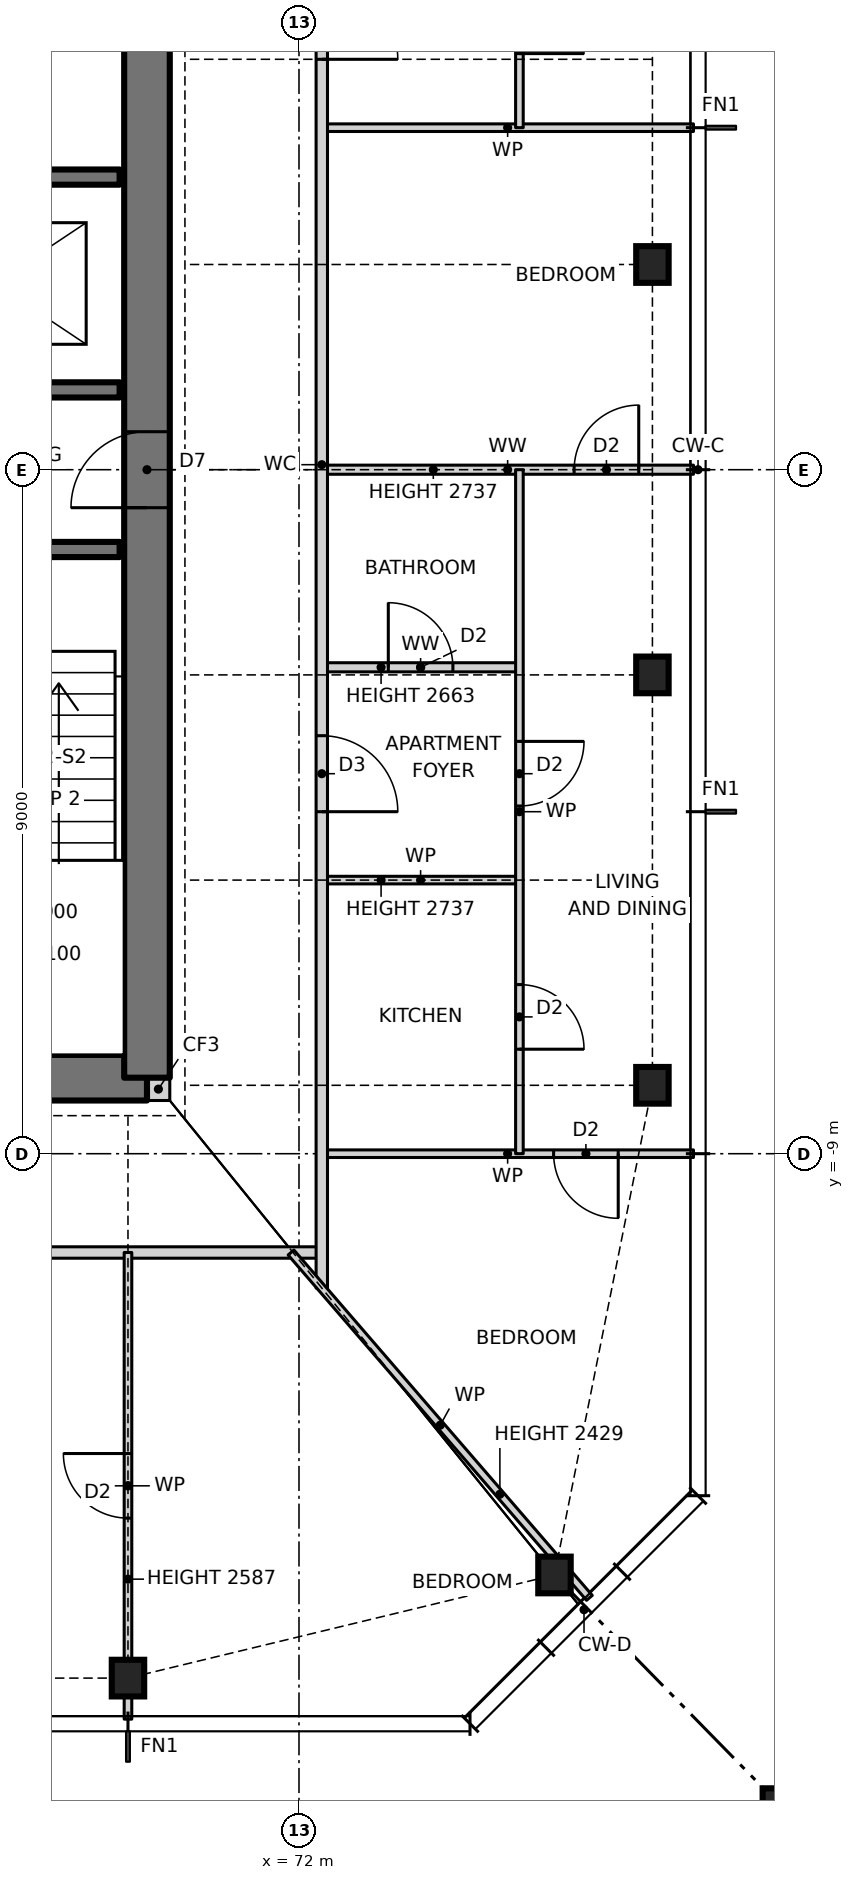
"""IFC4 building model, lengths in metres.
Left out: names, types, materials, properties, quantities, classifications, styles, units other than length and angle.
Written with IfcOpenShell. Run it as: python <this file> out.ifc"""

import sys

from ifc_helpers import new_model, si_unit, direction, frame, frame_2d, origin, origin_2d, place, context, subcontext, project, spatial, rectangle, hollow_rectangle, i_section, extrude, element, fill, save


model = new_model("IFC4")
c1 = context("Model", 3, precision=1e-05, world=origin(), true_north=direction((0.0, 1.0)))
c2 = subcontext(c1, "Body", "Model", "MODEL_VIEW")
j1 = project(units=[si_unit("LENGTHUNIT", "METRE"), si_unit("PLANEANGLEUNIT", "RADIAN")], contexts=[c1])
p1 = place(None, origin())
s1 = spatial("IfcSite", under=j1, at=p1, CompositionType="ELEMENT")
p2 = place(p1, origin())
s2 = spatial("IfcBuilding", under=s1, at=p2, CompositionType="ELEMENT")
p3 = place(p2, frame((0.0, 0.0, 105.0)))
s3 = spatial("IfcBuildingStorey", under=s2, at=p3, CompositionType="ELEMENT", Elevation=105.0)
for number, where, z_axis, x_axis in (
    (1, (69.75, -15.9, 0.0), (0.0, 0.0, 1.0), (1.0, 0.0, 0.0)),
    (2, (75.361, -14.543, 0.0), (0.0, 0.0, 1.0), (1.0, 0.0, 0.0)),
    (3, (76.65, -8.1, 0.0), (0.0, 0.0, 1.0), (1.0, 0.0, 0.0)),
    (4, (76.65, -2.7, 0.0), (0.0, 0.0, 1.0), (1.0, 0.0, 0.0)),
    (5, (76.65, 2.7, 0.0), (0.0, 0.0, 1.0), (1.0, 0.0, 0.0)),
):
    element("IfcColumn", number, at=place(p3, frame(where, z_axis=z_axis, x_axis=x_axis)), inside=s3, PredefinedType="COLUMN", context=c2, shape_type="SweptSolid", body=[
        extrude(i_section(OverallWidth=0.427, OverallDepth=0.483, WebThickness=0.051, FlangeThickness=0.082, at=origin_2d()), origin(), (0.0, 0.0, 1.0), 3.5),
    ])
p4 = place(p3, frame((78.65, -17.9, 0.0), z_axis=(0.0, 0.0, 1.0), x_axis=(1.0, 0.0, 0.0)))
e6 = element("IfcColumn", 6, at=p4, inside=s3, PredefinedType="COLUMN", context=c2, shape_type="SweptSolid", body=[
    extrude(hollow_rectangle(XDim=1.1, YDim=1.1, WallThickness=0.06, at=origin_2d()), origin(), (0.0, 0.0, 1.0), 3.5),
])
p5 = place(p3, frame((70.0, -8.15, 0.0), z_axis=(0.0, 0.0, 1.0), x_axis=(1.0, 0.0, 0.0)))
e7 = element("IfcWall", 7, at=p5, inside=s3, PredefinedType="SOLIDWALL", context=c2, shape_type="SweptSolid", body=[
    extrude(rectangle(XDim=0.3, YDim=0.3, at=frame_2d((0.15, 0.0))), origin(), (0.0, 0.0, 1.0), 3.5),
])
p6 = place(p3, frame((56.0, -8.0, 0.0), z_axis=(0.0, 0.0, 1.0), x_axis=(1.0, 0.0, 0.0)))
e8 = element("IfcWall", 8, at=p6, inside=s3, PredefinedType="SHEAR", context=c2, shape_type="SweptSolid", body=[
    extrude(rectangle(XDim=14.0, YDim=0.6, at=frame_2d((7.0, 0.0))), origin(), (0.0, 0.0, 1.0), 3.5),
])
p7 = place(p6, frame((2.7, 0.0, 0.0)))
e9 = element("IfcOpeningElement", 9, at=p7, cuts=e8, PredefinedType="OPENING", context=c2, shape_type="SweptSolid", body=[
    extrude(rectangle(XDim=0.9, YDim=2.1, at=frame_2d((0.45, 1.05))), frame((0.0, 0.31, 0.0), z_axis=(0.0, -1.0, 0.0), x_axis=(1.0, 0.0, 0.0)), (0.0, 0.0, 1.0), 0.62),
])
p8 = place(p6, frame((7.7, 0.0, 0.0)))
e10 = element("IfcOpeningElement", 10, at=p8, cuts=e8, PredefinedType="OPENING", context=c2, shape_type="SweptSolid", body=[
    extrude(rectangle(XDim=0.9, YDim=2.1, at=frame_2d((0.45, 1.05))), frame((0.0, 0.31, 0.0), z_axis=(0.0, -1.0, 0.0), x_axis=(1.0, 0.0, 0.0)), (0.0, 0.0, 1.0), 0.62),
])
p9 = place(p3, frame((70.0, -8.0, 0.0), z_axis=(0.0, 0.0, 1.0), x_axis=(0.0, 1.0, 0.0)))
e11 = element("IfcWall", 11, at=p9, inside=s3, PredefinedType="SHEAR", context=c2, shape_type="SweptSolid", body=[
    extrude(rectangle(XDim=16.0, YDim=0.6, at=frame_2d((8.0, 0.0))), origin(), (0.0, 0.0, 1.0), 3.5),
])
p10 = place(p9, frame((7.5, 0.0, 0.0)))
e12 = element("IfcOpeningElement", 12, at=p10, cuts=e11, PredefinedType="OPENING", context=c2, shape_type="SweptSolid", body=[
    extrude(rectangle(XDim=1.0, YDim=2.1, at=frame_2d((0.5, 1.05))), frame((0.0, 0.31, 0.0), z_axis=(0.0, -1.0, 0.0), x_axis=(1.0, 0.0, 0.0)), (0.0, 0.0, 1.0), 0.62),
])
p11 = place(p3, frame((53.7, -10.3, 0.0), z_axis=(0.0, 0.0, 1.0), x_axis=(1.0, 0.0, 0.0)))
e13 = element("IfcWall", 13, at=p11, inside=s3, PredefinedType="PARTITIONING", context=c2, shape_type="SweptSolid", body=[
    extrude(rectangle(XDim=18.6, YDim=0.15, at=frame_2d((9.3, 0.0))), origin(), (0.0, 0.0, 1.0), 3.27),
])
p12 = place(p11, frame((8.8, 0.0, 0.0)))
e14 = element("IfcOpeningElement", 14, at=p12, cuts=e13, PredefinedType="OPENING", context=c2, shape_type="SweptSolid", body=[
    extrude(rectangle(XDim=1.0, YDim=2.1, at=frame_2d((0.5, 1.05))), frame((0.0, 0.085, 0.0), z_axis=(0.0, -1.0, 0.0), x_axis=(1.0, 0.0, 0.0)), (0.0, 0.0, 1.0), 0.17),
])
p13 = place(p3, frame((72.3, -9.0, 0.0), z_axis=(0.0, 0.0, 1.0), x_axis=(1.0, 0.0, 0.0)))
e15 = element("IfcWall", 15, at=p13, inside=s3, PredefinedType="PARTITIONING", context=c2, shape_type="SweptSolid", body=[
    extrude(rectangle(XDim=4.89, YDim=0.1, at=frame_2d((2.445, 0.0))), origin(), (0.0, 0.0, 1.0), 3.27),
])
p14 = place(p13, frame((3.05, 0.0, 0.0)))
e16 = element("IfcOpeningElement", 16, at=p14, cuts=e15, PredefinedType="OPENING", context=c2, shape_type="SweptSolid", body=[
    extrude(rectangle(XDim=0.85, YDim=2.1, at=frame_2d((0.425, 1.05))), frame((0.0, 0.06, 0.0), z_axis=(0.0, -1.0, 0.0), x_axis=(1.0, 0.0, 0.0)), (0.0, 0.0, 1.0), 0.12),
])
p15 = place(p3, frame((72.3, -5.4, 0.0), z_axis=(0.0, 0.0, 1.0), x_axis=(1.0, 0.0, 0.0)))
e17 = element("IfcWall", 17, at=p15, inside=s3, PredefinedType="PARTITIONING", context=c2, shape_type="SweptSolid", body=[
    extrude(rectangle(XDim=2.6, YDim=0.1, at=frame_2d((1.3, 0.0))), origin(), (0.0, 0.0, 1.0), 2.737),
])
p16 = place(p3, frame((72.3, -2.6, 0.0), z_axis=(0.0, 0.0, 1.0), x_axis=(1.0, 0.0, 0.0)))
e18 = element("IfcWall", 18, at=p16, inside=s3, PredefinedType="PARTITIONING", context=c2, shape_type="SweptSolid", body=[
    extrude(rectangle(XDim=2.6, YDim=0.12, at=frame_2d((1.3, 0.0))), origin(), (0.0, 0.0, 1.0), 2.663),
])
p17 = place(p16, frame((0.875, 0.0, 0.0)))
e19 = element("IfcOpeningElement", 19, at=p17, cuts=e18, PredefinedType="OPENING", context=c2, shape_type="SweptSolid", body=[
    extrude(rectangle(XDim=0.85, YDim=2.1, at=frame_2d((0.425, 1.05))), frame((0.0, 0.07, 0.0), z_axis=(0.0, -1.0, 0.0), x_axis=(1.0, 0.0, 0.0)), (0.0, 0.0, 1.0), 0.14),
])
p18 = place(p3, frame((56.36, -1.05, 0.0), z_axis=(0.0, 0.0, 1.0), x_axis=(1.0, 0.0, 0.0)))
e20 = element("IfcWall", 20, at=p18, inside=s3, PredefinedType="SOLIDWALL", context=c2, shape_type="SweptSolid", body=[
    extrude(rectangle(XDim=13.28, YDim=0.2, at=frame_2d((6.64, 0.0))), origin(), (0.0, 0.0, 1.0), 3.5),
])
p19 = place(p18, frame((11.11, 0.0, 0.0)))
e21 = element("IfcOpeningElement", 21, at=p19, cuts=e20, PredefinedType="OPENING", context=c2, shape_type="SweptSolid", body=[
    extrude(rectangle(XDim=1.0, YDim=2.1, at=frame_2d((0.5, 1.05))), frame((0.0, 0.11, 0.0), z_axis=(0.0, -1.0, 0.0), x_axis=(1.0, 0.0, 0.0)), (0.0, 0.0, 1.0), 0.22),
])
p20 = place(p18, frame((1.087, 0.0, 0.0)))
e22 = element("IfcOpeningElement", 22, at=p20, cuts=e20, PredefinedType="OPENING", context=c2, shape_type="SweptSolid", body=[
    extrude(rectangle(XDim=1.1, YDim=2.1, at=frame_2d((0.55, 1.05))), frame((0.0, 0.11, 0.0), z_axis=(0.0, -1.0, 0.0), x_axis=(1.0, 0.0, 0.0)), (0.0, 0.0, 1.0), 0.22),
])
p21 = place(p18, frame((4.39, 0.0, 0.0)))
e23 = element("IfcOpeningElement", 23, at=p21, cuts=e20, PredefinedType="OPENING", context=c2, shape_type="SweptSolid", body=[
    extrude(rectangle(XDim=1.1, YDim=2.1, at=frame_2d((0.55, 1.05))), frame((0.0, 0.11, 0.0), z_axis=(0.0, -1.0, 0.0), x_axis=(1.0, 0.0, 0.0)), (0.0, 0.0, 1.0), 0.22),
])
p22 = place(p18, frame((7.724, 0.0, 0.0)))
e24 = element("IfcOpeningElement", 24, at=p22, cuts=e20, PredefinedType="OPENING", context=c2, shape_type="SweptSolid", body=[
    extrude(rectangle(XDim=1.1, YDim=2.1, at=frame_2d((0.55, 1.05))), frame((0.0, 0.11, 0.0), z_axis=(0.0, -1.0, 0.0), x_axis=(1.0, 0.0, 0.0)), (0.0, 0.0, 1.0), 0.22),
])
p23 = place(p3, frame((72.3, 0.0, 0.0), z_axis=(0.0, 0.0, 1.0), x_axis=(1.0, 0.0, 0.0)))
e25 = element("IfcWall", 25, at=p23, inside=s3, PredefinedType="PARTITIONING", context=c2, shape_type="SweptSolid", body=[
    extrude(rectangle(XDim=4.89, YDim=0.12, at=frame_2d((2.445, 0.0))), origin(), (0.0, 0.0, 1.0), 2.737),
])
p24 = place(p23, frame((3.32, 0.0, 0.0)))
e26 = element("IfcOpeningElement", 26, at=p24, cuts=e25, PredefinedType="OPENING", context=c2, shape_type="SweptSolid", body=[
    extrude(rectangle(XDim=0.85, YDim=2.1, at=frame_2d((0.425, 1.05))), frame((0.0, 0.07, 0.0), z_axis=(0.0, -1.0, 0.0), x_axis=(1.0, 0.0, 0.0)), (0.0, 0.0, 1.0), 0.14),
])
p25 = place(p3, frame((56.36, 1.05, 0.0), z_axis=(0.0, 0.0, 1.0), x_axis=(1.0, 0.0, 0.0)))
e27 = element("IfcWall", 27, at=p25, inside=s3, PredefinedType="SOLIDWALL", context=c2, shape_type="SweptSolid", body=[
    extrude(rectangle(XDim=13.28, YDim=0.2, at=frame_2d((6.64, 0.0))), origin(), (0.0, 0.0, 1.0), 3.5),
])
p26 = place(p25, frame((1.17, 0.0, 0.0)))
e28 = element("IfcOpeningElement", 28, at=p26, cuts=e27, PredefinedType="OPENING", context=c2, shape_type="SweptSolid", body=[
    extrude(rectangle(XDim=1.0, YDim=2.1, at=frame_2d((0.5, 1.05))), frame((0.0, 0.11, 0.0), z_axis=(0.0, -1.0, 0.0), x_axis=(1.0, 0.0, 0.0)), (0.0, 0.0, 1.0), 0.22),
])
p27 = place(p25, frame((7.54, 0.0, 0.0)))
e29 = element("IfcOpeningElement", 29, at=p27, cuts=e27, PredefinedType="OPENING", context=c2, shape_type="SweptSolid", body=[
    extrude(rectangle(XDim=0.9, YDim=2.1, at=frame_2d((0.45, 1.05))), frame((0.0, 0.11, 0.0), z_axis=(0.0, -1.0, 0.0), x_axis=(1.0, 0.0, 0.0)), (0.0, 0.0, 1.0), 0.22),
])
p28 = place(p25, frame((4.24, 0.0, 0.0)))
e30 = element("IfcOpeningElement", 30, at=p28, cuts=e27, PredefinedType="OPENING", context=c2, shape_type="SweptSolid", body=[
    extrude(rectangle(XDim=0.9, YDim=2.1, at=frame_2d((0.45, 1.05))), frame((0.0, 0.11, 0.0), z_axis=(0.0, -1.0, 0.0), x_axis=(1.0, 0.0, 0.0)), (0.0, 0.0, 1.0), 0.22),
])
p29 = place(p25, frame((10.96, 0.0, 0.0)))
e31 = element("IfcOpeningElement", 31, at=p29, cuts=e27, PredefinedType="OPENING", context=c2, shape_type="SweptSolid", body=[
    extrude(rectangle(XDim=1.3, YDim=2.1, at=frame_2d((0.65, 1.05))), frame((0.0, 0.11, 0.0), z_axis=(0.0, -1.0, 0.0), x_axis=(1.0, 0.0, 0.0)), (0.0, 0.0, 1.0), 0.22),
])
p30 = place(p3, frame((59.7, 3.85, 0.0), z_axis=(0.0, 0.0, 1.0), x_axis=(1.0, 0.0, 0.0)))
e32 = element("IfcWall", 32, at=p30, inside=s3, PredefinedType="SOLIDWALL", context=c2, shape_type="SweptSolid", body=[
    extrude(rectangle(XDim=9.94, YDim=0.2, at=frame_2d((4.97, 0.0))), origin(), (0.0, 0.0, 1.0), 3.5),
])
p31 = place(p3, frame((72.3, 4.5, 0.0), z_axis=(0.0, 0.0, 1.0), x_axis=(1.0, 0.0, 0.0)))
e33 = element("IfcWall", 33, at=p31, inside=s3, PredefinedType="PARTITIONING", context=c2, shape_type="SweptSolid", body=[
    extrude(rectangle(XDim=4.89, YDim=0.1, at=frame_2d((2.445, 0.0))), origin(), (0.0, 0.0, 1.0), 3.27),
])
p32 = place(p3, frame((74.9, -9.0, 0.0), z_axis=(0.0, 0.0, 1.0), x_axis=(0.0, 1.0, 0.0)))
e34 = element("IfcWall", 34, at=p32, inside=s3, PredefinedType="PARTITIONING", context=c2, shape_type="SweptSolid", body=[
    extrude(rectangle(XDim=9.0, YDim=0.1, at=frame_2d((4.5, 0.0))), origin(), (0.0, 0.0, 1.0), 3.27),
])
p33 = place(p32, frame((1.375, 0.0, 0.0)))
e35 = element("IfcOpeningElement", 35, at=p33, cuts=e34, PredefinedType="OPENING", context=c2, shape_type="SweptSolid", body=[
    extrude(rectangle(XDim=0.85, YDim=2.1, at=frame_2d((0.425, 1.05))), frame((0.0, 0.06, 0.0), z_axis=(0.0, -1.0, 0.0), x_axis=(1.0, 0.0, 0.0)), (0.0, 0.0, 1.0), 0.12),
])
p34 = place(p32, frame((4.575, 0.0, 0.0)))
e36 = element("IfcOpeningElement", 36, at=p34, cuts=e34, PredefinedType="OPENING", context=c2, shape_type="SweptSolid", body=[
    extrude(rectangle(XDim=0.85, YDim=2.1, at=frame_2d((0.425, 1.05))), frame((0.0, 0.06, 0.0), z_axis=(0.0, -1.0, 0.0), x_axis=(1.0, 0.0, 0.0)), (0.0, 0.0, 1.0), 0.12),
])
p35 = place(p3, frame((74.9, 4.5, 0.0), z_axis=(0.0, 0.0, 1.0), x_axis=(0.0, 1.0, 0.0)))
e37 = element("IfcWall", 37, at=p35, inside=s3, PredefinedType="PARTITIONING", context=c2, shape_type="SweptSolid", body=[
    extrude(rectangle(XDim=2.8, YDim=0.1, at=frame_2d((1.4, 0.0))), origin(), (0.0, 0.0, 1.0), 3.27),
])
p36 = place(p35, frame((0.975, 0.0, 0.0)))
e38 = element("IfcOpeningElement", 38, at=p36, cuts=e37, PredefinedType="OPENING", context=c2, shape_type="SweptSolid", body=[
    extrude(rectangle(XDim=0.85, YDim=2.1, at=frame_2d((0.425, 1.05))), frame((0.0, 0.06, 0.0), z_axis=(0.0, -1.0, 0.0), x_axis=(1.0, 0.0, 0.0)), (0.0, 0.0, 1.0), 0.12),
])
p37 = place(p3, frame((72.3, -10.768, 0.0), z_axis=(0.0, 0.0, 1.0), x_axis=(0.0, 1.0, 0.0)))
e39 = element("IfcWall", 39, at=p37, inside=s3, PredefinedType="PARTITIONING", context=c2, shape_type="SweptSolid", body=[
    extrude(rectangle(XDim=21.668, YDim=0.15, at=frame_2d((10.834, 0.0))), origin(), (0.0, 0.0, 1.0), 3.27),
])
p38 = place(p37, frame((6.268, 0.0, 0.0)))
e40 = element("IfcOpeningElement", 40, at=p38, cuts=e39, PredefinedType="OPENING", context=c2, shape_type="SweptSolid", body=[
    extrude(rectangle(XDim=1.0, YDim=2.1, at=frame_2d((0.5, 1.05))), frame((0.0, 0.085, 0.0), z_axis=(0.0, -1.0, 0.0), x_axis=(1.0, 0.0, 0.0)), (0.0, 0.0, 1.0), 0.17),
])
p39 = place(p37, frame((16.168, 0.0, 0.0)))
e41 = element("IfcOpeningElement", 41, at=p39, cuts=e39, PredefinedType="OPENING", context=c2, shape_type="SweptSolid", body=[
    extrude(rectangle(XDim=1.0, YDim=2.1, at=frame_2d((0.5, 1.05))), frame((0.0, 0.085, 0.0), z_axis=(0.0, -1.0, 0.0), x_axis=(1.0, 0.0, 0.0)), (0.0, 0.0, 1.0), 0.17),
])
p40 = place(p3, frame((69.75, -16.44, 0.0), z_axis=(0.0, 0.0, 1.0), x_axis=(0.0, 1.0, 0.0)))
e42 = element("IfcWall", 42, at=p40, inside=s3, PredefinedType="PARTITIONING", context=c2, shape_type="SweptSolid", body=[
    extrude(rectangle(XDim=6.14, YDim=0.1, at=frame_2d((3.07, 0.0))), origin(), (0.0, 0.0, 1.0), 2.587),
])
p41 = place(p40, frame((2.645, 0.0, 0.0)))
e43 = element("IfcOpeningElement", 43, at=p41, cuts=e42, PredefinedType="OPENING", context=c2, shape_type="SweptSolid", body=[
    extrude(rectangle(XDim=0.85, YDim=2.1, at=frame_2d((0.425, 1.05))), frame((0.0, 0.06, 0.0), z_axis=(0.0, -1.0, 0.0), x_axis=(1.0, 0.0, 0.0)), (0.0, 0.0, 1.0), 0.12),
])
p42 = place(p3, frame((75.821, -14.844, 0.0), z_axis=(0.0, 0.0, 1.0), x_axis=(-0.65378286253, 0.756682211144, 0.0)))
e44 = element("IfcWall", 44, at=p42, inside=s3, PredefinedType="PARTITIONING", context=c2, shape_type="SweptSolid", body=[
    extrude(rectangle(XDim=6.005, YDim=0.1, at=frame_2d((3.002, 0.0))), origin(), (0.0, 0.0, 1.0), 2.429),
])
p43 = place(p41, origin())
e45 = element("IfcDoor", 45, at=p43, inside=s3, OperationType="SINGLE_SWING_RIGHT", PredefinedType="DOOR", context=c2, shape_type="SweptSolid", body=[
    extrude(rectangle(XDim=0.85, YDim=2.1, at=frame_2d((0.425, 1.05))), frame((0.0, 0.025, 0.0), z_axis=(0.0, -1.0, 0.0), x_axis=(1.0, 0.0, 0.0)), (0.0, 0.0, 1.0), 0.05),
])
fill(e43, e45)
p44 = place(p33, frame((0.85, 0.0, 0.0), z_axis=(0.0, 0.0, 1.0), x_axis=(-1.0, 0.0, 0.0)))
e46 = element("IfcDoor", 46, at=p44, inside=s3, OperationType="SINGLE_SWING_RIGHT", PredefinedType="DOOR", context=c2, shape_type="SweptSolid", body=[
    extrude(rectangle(XDim=0.85, YDim=2.1, at=frame_2d((0.425, 1.05))), frame((0.0, 0.025, 0.0), z_axis=(0.0, -1.0, 0.0), x_axis=(1.0, 0.0, 0.0)), (0.0, 0.0, 1.0), 0.05),
])
fill(e35, e46)
p45 = place(p38, frame((1.0, 0.0, 0.0), z_axis=(0.0, 0.0, 1.0), x_axis=(-1.0, 0.0, 0.0)))
e47 = element("IfcDoor", 47, at=p45, inside=s3, OperationType="SINGLE_SWING_RIGHT", PredefinedType="DOOR", context=c2, shape_type="SweptSolid", body=[
    extrude(rectangle(XDim=1.0, YDim=2.1, at=frame_2d((0.5, 1.05))), frame((0.0, 0.025, 0.0), z_axis=(0.0, -1.0, 0.0), x_axis=(1.0, 0.0, 0.0)), (0.0, 0.0, 1.0), 0.05),
])
fill(e40, e47)
p46 = place(p34, frame((0.85, 0.0, 0.0), z_axis=(0.0, 0.0, 1.0), x_axis=(-1.0, 0.0, 0.0)))
e48 = element("IfcDoor", 48, at=p46, inside=s3, OperationType="SINGLE_SWING_LEFT", PredefinedType="DOOR", context=c2, shape_type="SweptSolid", body=[
    extrude(rectangle(XDim=0.85, YDim=2.1, at=frame_2d((0.425, 1.05))), frame((0.0, 0.025, 0.0), z_axis=(0.0, -1.0, 0.0), x_axis=(1.0, 0.0, 0.0)), (0.0, 0.0, 1.0), 0.05),
])
fill(e36, e48)
p47 = place(p17, origin())
e49 = element("IfcDoor", 49, at=p47, inside=s3, OperationType="SINGLE_SWING_LEFT", PredefinedType="DOOR", context=c2, shape_type="SweptSolid", body=[
    extrude(rectangle(XDim=0.85, YDim=2.1, at=frame_2d((0.425, 1.05))), frame((0.0, 0.025, 0.0), z_axis=(0.0, -1.0, 0.0), x_axis=(1.0, 0.0, 0.0)), (0.0, 0.0, 1.0), 0.05),
])
fill(e19, e49)
p48 = place(p14, frame((0.85, 0.0, 0.0), z_axis=(0.0, 0.0, 1.0), x_axis=(-1.0, 0.0, 0.0)))
e50 = element("IfcDoor", 50, at=p48, inside=s3, OperationType="SINGLE_SWING_LEFT", PredefinedType="DOOR", context=c2, shape_type="SweptSolid", body=[
    extrude(rectangle(XDim=0.85, YDim=2.1, at=frame_2d((0.425, 1.05))), frame((0.0, 0.025, 0.0), z_axis=(0.0, -1.0, 0.0), x_axis=(1.0, 0.0, 0.0)), (0.0, 0.0, 1.0), 0.05),
])
fill(e16, e50)
p49 = place(p24, origin())
e51 = element("IfcDoor", 51, at=p49, inside=s3, OperationType="SINGLE_SWING_RIGHT", PredefinedType="DOOR", context=c2, shape_type="SweptSolid", body=[
    extrude(rectangle(XDim=0.85, YDim=2.1, at=frame_2d((0.425, 1.05))), frame((0.0, 0.025, 0.0), z_axis=(0.0, -1.0, 0.0), x_axis=(1.0, 0.0, 0.0)), (0.0, 0.0, 1.0), 0.05),
])
fill(e26, e51)
p50 = place(p39, frame((1.0, 0.0, 0.0), z_axis=(0.0, 0.0, 1.0), x_axis=(-1.0, 0.0, 0.0)))
e52 = element("IfcDoor", 52, at=p50, inside=s3, OperationType="SINGLE_SWING_RIGHT", PredefinedType="DOOR", context=c2, shape_type="SweptSolid", body=[
    extrude(rectangle(XDim=1.0, YDim=2.1, at=frame_2d((0.5, 1.05))), frame((0.0, 0.025, 0.0), z_axis=(0.0, -1.0, 0.0), x_axis=(1.0, 0.0, 0.0)), (0.0, 0.0, 1.0), 0.05),
])
fill(e41, e52)
p51 = place(p36, frame((0.85, 0.0, 0.0), z_axis=(0.0, 0.0, 1.0), x_axis=(-1.0, 0.0, 0.0)))
e53 = element("IfcDoor", 53, at=p51, inside=s3, OperationType="SINGLE_SWING_RIGHT", PredefinedType="DOOR", context=c2, shape_type="SweptSolid", body=[
    extrude(rectangle(XDim=0.85, YDim=2.1, at=frame_2d((0.425, 1.05))), frame((0.0, 0.025, 0.0), z_axis=(0.0, -1.0, 0.0), x_axis=(1.0, 0.0, 0.0)), (0.0, 0.0, 1.0), 0.05),
])
fill(e38, e53)
p52 = place(p10, origin())
e54 = element("IfcDoor", 54, at=p52, inside=s3, OperationType="SINGLE_SWING_LEFT", PredefinedType="DOOR", context=c2, shape_type="SweptSolid", body=[
    extrude(rectangle(XDim=1.0, YDim=2.1, at=frame_2d((0.5, 1.05))), frame((0.0, 0.025, 0.0), z_axis=(0.0, -1.0, 0.0), x_axis=(1.0, 0.0, 0.0)), (0.0, 0.0, 1.0), 0.05),
])
fill(e12, e54)
save(model, sys.argv[1])
